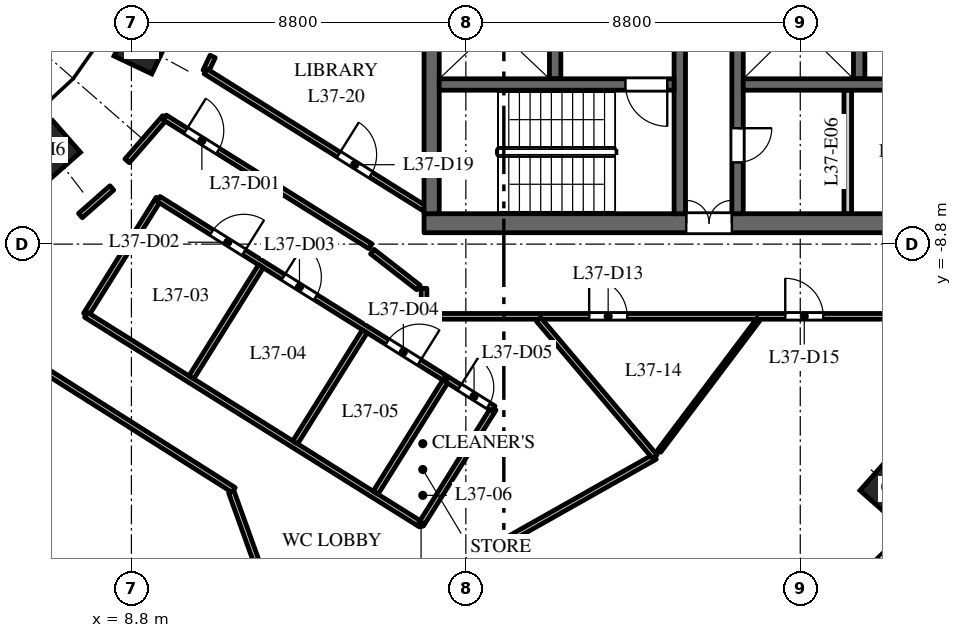
"""IFC4 building model, lengths in metres.
Left out: names, types, materials, properties, quantities, classifications, styles, units other than length and angle.
Written with IfcOpenShell. Run it as: python <this file> out.ifc"""

import sys

from ifc_helpers import new_model, si_unit, direction, frame, frame_2d, origin, origin_2d, place, context, subcontext, project, spatial, rectangle, extrude, element, fill, save


model = new_model("IFC4")
c1 = context("Model", 3, precision=1e-05, world=origin(), true_north=direction((0.0, 1.0)))
c2 = subcontext(c1, "Body", "Model", "MODEL_VIEW")
j1 = project(units=[si_unit("LENGTHUNIT", "METRE"), si_unit("PLANEANGLEUNIT", "RADIAN")], contexts=[c1])
p1 = place(None, origin())
s1 = spatial("IfcSite", under=j1, at=p1, CompositionType="ELEMENT")
p2 = place(p1, origin())
s2 = spatial("IfcBuilding", under=s1, at=p2, CompositionType="ELEMENT")
p3 = place(p2, frame((0.0, 0.0, 162.0)))
s3 = spatial("IfcBuildingStorey", under=s2, at=p3, CompositionType="ELEMENT", Elevation=162.0)
p4 = place(p3, frame((28.819, -15.23, 0.0), z_axis=(0.0, 0.0, 1.0), x_axis=(0.662635642662, 0.748941923699, 0.0)))
e1 = element("IfcColumn", 1, at=p4, inside=s3, PredefinedType="COLUMN", context=c2, shape_type="SweptSolid", body=[
    extrude(rectangle(XDim=1.2, YDim=1.2, at=origin_2d()), origin(), (0.0, 0.0, 1.0), 4.0),
])
for number, where, z_axis, x_axis in (
    (2, (6.682, -6.334, 0.0), (0.0, 0.0, 1.0), (0.751, 0.66, 0.0)),
    (3, (9.076, -3.588, 0.0), (0.0, 0.0, 1.0), (0.429, 0.903, 0.0)),
):
    element("IfcColumn", number, at=place(p3, frame(where, z_axis=z_axis, x_axis=x_axis)), inside=s3, PredefinedType="COLUMN", context=c2, shape_type="SweptSolid", body=[
        extrude(rectangle(XDim=1.1, YDim=1.1, at=origin_2d()), origin(), (0.0, 0.0, 1.0), 4.0),
    ])
p5 = place(p3, frame((16.5, -8.25, 0.0), z_axis=(0.0, 0.0, 1.0), x_axis=(1.0, 0.0, 0.0)))
e4 = element("IfcWall", 4, at=p5, inside=s3, PredefinedType="SHEAR", context=c2, shape_type="SweptSolid", body=[
    extrude(rectangle(XDim=15.0, YDim=0.5, at=frame_2d((7.5, 0.0))), origin(), (0.0, 0.0, 1.0), 3.7),
])
p6 = place(p5, frame((6.9, 0.0, 0.0)))
e5 = element("IfcOpeningElement", 5, at=p6, cuts=e4, PredefinedType="OPENING", context=c2, shape_type="SweptSolid", body=[
    extrude(rectangle(XDim=1.2, YDim=2.1, at=frame_2d((0.6, 1.05))), frame((0.0, 0.26, 0.0), z_axis=(0.0, -1.0, 0.0), x_axis=(1.0, 0.0, 0.0)), (0.0, 0.0, 1.0), 0.52),
])
p7 = place(p5, frame((12.425, 0.0, 0.0)))
e6 = element("IfcOpeningElement", 6, at=p7, cuts=e4, PredefinedType="OPENING", context=c2, shape_type="SweptSolid", body=[
    extrude(rectangle(XDim=0.9, YDim=2.1, at=frame_2d((0.45, 1.05))), frame((0.0, 0.26, 0.0), z_axis=(0.0, -1.0, 0.0), x_axis=(1.0, 0.0, 0.0)), (0.0, 0.0, 1.0), 0.52),
])
p8 = place(p3, frame((27.95, -4.45, 0.0), z_axis=(0.0, 0.0, 1.0), x_axis=(0.0, 1.0, 0.0)))
e7 = element("IfcWall", 7, at=p8, inside=s3, PredefinedType="SHEAR", context=c2, shape_type="SweptSolid", body=[
    extrude(rectangle(XDim=8.9, YDim=0.3, at=frame_2d((4.45, 0.0))), origin(), (0.0, 0.0, 1.0), 3.7),
])
p9 = place(p3, frame((19.95, -4.45, 0.0), z_axis=(0.0, 0.0, 1.0), x_axis=(0.0, 1.0, 0.0)))
e8 = element("IfcWall", 8, at=p9, inside=s3, PredefinedType="SHEAR", context=c2, shape_type="SweptSolid", body=[
    extrude(rectangle(XDim=8.9, YDim=0.3, at=frame_2d((4.45, 0.0))), origin(), (0.0, 0.0, 1.0), 3.7),
])
p10 = place(p9, frame((0.775, 0.0, 0.0)))
e9 = element("IfcOpeningElement", 9, at=p10, cuts=e8, PredefinedType="OPENING", context=c2, shape_type="SweptSolid", body=[
    extrude(rectangle(XDim=1.2, YDim=2.1, at=frame_2d((0.6, 1.05))), frame((0.0, 0.16, 0.0), z_axis=(0.0, -1.0, 0.0), x_axis=(1.0, 0.0, 0.0)), (0.0, 0.0, 1.0), 0.32),
])
p11 = place(p9, frame((4.675, 0.0, 0.0)))
e10 = element("IfcOpeningElement", 10, at=p11, cuts=e8, PredefinedType="OPENING", context=c2, shape_type="SweptSolid", body=[
    extrude(rectangle(XDim=1.1, YDim=2.1, at=frame_2d((0.55, 1.05))), frame((0.0, 0.16, 0.0), z_axis=(0.0, -1.0, 0.0), x_axis=(1.0, 0.0, 0.0)), (0.0, 0.0, 1.0), 0.32),
])
p12 = place(p9, frame((7.25, 0.0, 0.0)))
e11 = element("IfcOpeningElement", 11, at=p12, cuts=e8, PredefinedType="OPENING", context=c2, shape_type="SweptSolid", body=[
    extrude(rectangle(XDim=1.1, YDim=2.1, at=frame_2d((0.55, 1.05))), frame((0.0, 0.16, 0.0), z_axis=(0.0, -1.0, 0.0), x_axis=(1.0, 0.0, 0.0)), (0.0, 0.0, 1.0), 0.32),
])
p13 = place(p3, frame((24.75, -8.0, 0.0), z_axis=(0.0, 0.0, 1.0), x_axis=(0.0, 1.0, 0.0)))
e12 = element("IfcWall", 12, at=p13, inside=s3, PredefinedType="SHEAR", context=c2, shape_type="SweptSolid", body=[
    extrude(rectangle(XDim=16.0, YDim=0.3, at=frame_2d((8.0, 0.0))), origin(), (0.0, 0.0, 1.0), 3.7),
])
p14 = place(p13, frame((4.425, 0.0, 0.0)))
e13 = element("IfcOpeningElement", 13, at=p14, cuts=e12, PredefinedType="OPENING", context=c2, shape_type="SweptSolid", body=[
    extrude(rectangle(XDim=1.1, YDim=2.1, at=frame_2d((0.55, 1.05))), frame((0.0, 0.16, 0.0), z_axis=(0.0, -1.0, 0.0), x_axis=(1.0, 0.0, 0.0)), (0.0, 0.0, 1.0), 0.32),
])
p15 = place(p13, frame((7.45, 0.0, 0.0)))
e14 = element("IfcOpeningElement", 14, at=p15, cuts=e12, PredefinedType="OPENING", context=c2, shape_type="SweptSolid", body=[
    extrude(rectangle(XDim=1.1, YDim=2.1, at=frame_2d((0.55, 1.05))), frame((0.0, 0.16, 0.0), z_axis=(0.0, -1.0, 0.0), x_axis=(1.0, 0.0, 0.0)), (0.0, 0.0, 1.0), 0.32),
])
p16 = place(p13, frame((10.475, 0.0, 0.0)))
e15 = element("IfcOpeningElement", 15, at=p16, cuts=e12, PredefinedType="OPENING", context=c2, shape_type="SweptSolid", body=[
    extrude(rectangle(XDim=1.1, YDim=2.1, at=frame_2d((0.55, 1.05))), frame((0.0, 0.16, 0.0), z_axis=(0.0, -1.0, 0.0), x_axis=(1.0, 0.0, 0.0)), (0.0, 0.0, 1.0), 0.32),
])
p17 = place(p13, frame((13.75, 0.0, 0.0)))
e16 = element("IfcOpeningElement", 16, at=p17, cuts=e12, PredefinedType="OPENING", context=c2, shape_type="SweptSolid", body=[
    extrude(rectangle(XDim=0.9, YDim=2.1, at=frame_2d((0.45, 1.05))), frame((0.0, 0.16, 0.0), z_axis=(0.0, -1.0, 0.0), x_axis=(1.0, 0.0, 0.0)), (0.0, 0.0, 1.0), 0.32),
])
p18 = place(p13, frame((1.35, 0.0, 0.0)))
e17 = element("IfcOpeningElement", 17, at=p18, cuts=e12, PredefinedType="OPENING", context=c2, shape_type="SweptSolid", body=[
    extrude(rectangle(XDim=0.9, YDim=2.1, at=frame_2d((0.45, 1.05))), frame((0.0, 0.16, 0.0), z_axis=(0.0, -1.0, 0.0), x_axis=(1.0, 0.0, 0.0)), (0.0, 0.0, 1.0), 0.32),
])
p19 = place(p3, frame((16.7, -8.0, 0.0), z_axis=(0.0, 0.0, 1.0), x_axis=(0.0, 1.0, 0.0)))
e18 = element("IfcWall", 18, at=p19, inside=s3, PredefinedType="SHEAR", context=c2, shape_type="SweptSolid", body=[
    extrude(rectangle(XDim=16.0, YDim=0.4, at=frame_2d((8.0, 0.0))), origin(), (0.0, 0.0, 1.0), 3.7),
])
p20 = place(p3, frame((27.65, -8.0, 0.0), z_axis=(0.0, 0.0, 1.0), x_axis=(0.0, 1.0, 0.0)))
e19 = element("IfcWall", 19, at=p20, inside=s3, PredefinedType="PARTITIONING", context=c2, shape_type="SweptSolid", body=[
    extrude(rectangle(XDim=3.25, YDim=0.2, at=frame_2d((1.625, 0.0))), origin(), (0.0, 0.0, 1.0), 3.7),
])
p21 = place(p3, frame((24.9, -4.6, 0.0), z_axis=(0.0, 0.0, 1.0), x_axis=(1.0, 0.0, 0.0)))
e20 = element("IfcWall", 20, at=p21, inside=s3, PredefinedType="SHEAR", context=c2, shape_type="SweptSolid", body=[
    extrude(rectangle(XDim=6.1, YDim=0.3, at=frame_2d((3.05, 0.0))), origin(), (0.0, 0.0, 1.0), 3.7),
])
p22 = place(p3, frame((23.23, -8.0, 0.0), z_axis=(0.0, 0.0, 1.0), x_axis=(0.0, 1.0, 0.0)))
e21 = element("IfcWall", 21, at=p22, inside=s3, PredefinedType="SHEAR", context=c2, shape_type="SweptSolid", body=[
    extrude(rectangle(XDim=7.875, YDim=0.3, at=frame_2d((3.938, 0.0))), origin(), (0.0, 0.0, 1.0), 3.7),
])
p23 = place(p22, frame((5.15, 0.0, 0.0)))
e22 = element("IfcOpeningElement", 22, at=p23, cuts=e21, PredefinedType="OPENING", context=c2, shape_type="SweptSolid", body=[
    extrude(rectangle(XDim=1.1, YDim=2.1, at=frame_2d((0.55, 1.05))), frame((0.0, 0.16, 0.0), z_axis=(0.0, -1.0, 0.0), x_axis=(1.0, 0.0, 0.0)), (0.0, 0.0, 1.0), 0.32),
])
p24 = place(p3, frame((16.9, -4.6, 0.0), z_axis=(0.0, 0.0, 1.0), x_axis=(1.0, 0.0, 0.0)))
e23 = element("IfcWall", 23, at=p24, inside=s3, PredefinedType="SHEAR", context=c2, shape_type="SweptSolid", body=[
    extrude(rectangle(XDim=6.18, YDim=0.3, at=frame_2d((3.09, 0.0))), origin(), (0.0, 0.0, 1.0), 3.7),
])
p25 = place(p24, frame((4.9, 0.0, 0.0)))
e24 = element("IfcOpeningElement", 24, at=p25, cuts=e23, PredefinedType="OPENING", context=c2, shape_type="SweptSolid", body=[
    extrude(rectangle(XDim=1.1, YDim=2.1, at=frame_2d((0.55, 1.05))), frame((0.0, 0.16, 0.0), z_axis=(0.0, -1.0, 0.0), x_axis=(1.0, 0.0, 0.0)), (0.0, 0.0, 1.0), 0.32),
])
p26 = place(p3, frame((3.036, -9.915, 0.0), z_axis=(0.0, 0.0, 1.0), x_axis=(0.844814664865, -0.535059045367, 0.0)))
e25 = element("IfcWall", 25, at=p26, inside=s3, PredefinedType="PARTITIONING", context=c2, shape_type="SweptSolid", body=[
    extrude(rectangle(XDim=10.008, YDim=0.15, at=frame_2d((5.004, 0.0))), origin(), (0.0, 0.0, 1.0), 2.85),
])
p27 = place(p3, frame((7.458, -8.049, 0.0), z_axis=(0.0, 0.0, 1.0), x_axis=(0.75060787095, 0.660747927782, 0.0)))
e26 = element("IfcWall", 26, at=p27, inside=s3, PredefinedType="PARTITIONING", context=c2, shape_type="SweptSolid", body=[
    extrude(rectangle(XDim=1.1, YDim=0.15, at=frame_2d((0.55, 0.0))), origin(), (0.0, 0.0, 1.0), 3.7),
])
p28 = place(p3, frame((7.605, -10.659, 0.0), z_axis=(0.0, 0.0, 1.0), x_axis=(0.530602380468, 0.847620855006, 0.0)))
e27 = element("IfcWall", 27, at=p28, inside=s3, PredefinedType="PARTITIONING", context=c2, shape_type="SweptSolid", body=[
    extrude(rectangle(XDim=3.6, YDim=0.15, at=frame_2d((1.8, 0.0))), origin(), (0.0, 0.0, 1.0), 3.7),
])
p29 = place(p3, frame((7.608, -10.661, 0.0), z_axis=(0.0, 0.0, 1.0), x_axis=(0.847562482532, -0.530695617284, 0.0)))
e28 = element("IfcWall", 28, at=p29, inside=s3, PredefinedType="PARTITIONING", context=c2, shape_type="SweptSolid", body=[
    extrude(rectangle(XDim=10.392, YDim=0.15, at=frame_2d((5.196, 0.0))), origin(), (0.0, 0.0, 1.0), 3.7),
])
p30 = place(p3, frame((8.687, -6.609, 0.0), z_axis=(0.0, 0.0, 1.0), x_axis=(0.656454677423, 0.75436546613, 0.0)))
e29 = element("IfcWall", 29, at=p30, inside=s3, PredefinedType="PARTITIONING", context=c2, shape_type="SweptSolid", body=[
    extrude(rectangle(XDim=1.511, YDim=0.15, at=frame_2d((0.755, 0.0))), origin(), (0.0, 0.0, 1.0), 3.7),
])
p31 = place(p3, frame((9.514, -7.61, 0.0), z_axis=(0.0, 0.0, 1.0), x_axis=(0.847740567707, -0.530411095155, 0.0)))
e30 = element("IfcWall", 30, at=p31, inside=s3, PredefinedType="PARTITIONING", context=c2, shape_type="SweptSolid", body=[
    extrude(rectangle(XDim=8.944, YDim=0.15, at=frame_2d((4.472, 0.0))), origin(), (0.0, 0.0, 1.0), 3.7),
])
p32 = place(p31, frame((1.65, 0.0, 0.0)))
e31 = element("IfcOpeningElement", 31, at=p32, cuts=e30, PredefinedType="OPENING", context=c2, shape_type="SweptSolid", body=[
    extrude(rectangle(XDim=1.0, YDim=2.1, at=frame_2d((0.5, 1.05))), frame((0.0, 0.085, 0.0), z_axis=(0.0, -1.0, 0.0), x_axis=(1.0, 0.0, 0.0)), (0.0, 0.0, 1.0), 0.17),
])
p33 = place(p31, frame((3.874, 0.0, 0.0)))
e32 = element("IfcOpeningElement", 32, at=p33, cuts=e30, PredefinedType="OPENING", context=c2, shape_type="SweptSolid", body=[
    extrude(rectangle(XDim=1.0, YDim=2.1, at=frame_2d((0.5, 1.05))), frame((0.0, 0.085, 0.0), z_axis=(0.0, -1.0, 0.0), x_axis=(1.0, 0.0, 0.0)), (0.0, 0.0, 1.0), 0.17),
])
p34 = place(p31, frame((7.098, 0.0, 0.0)))
e33 = element("IfcOpeningElement", 33, at=p34, cuts=e30, PredefinedType="OPENING", context=c2, shape_type="SweptSolid", body=[
    extrude(rectangle(XDim=1.0, YDim=2.1, at=frame_2d((0.5, 1.05))), frame((0.0, 0.085, 0.0), z_axis=(0.0, -1.0, 0.0), x_axis=(1.0, 0.0, 0.0)), (0.0, 0.0, 1.0), 0.17),
])
p35 = place(p3, frame((9.679, -5.469, 0.0), z_axis=(0.0, 0.0, 1.0), x_axis=(0.847602682855, -0.530631408811, 0.0)))
e34 = element("IfcWall", 34, at=p35, inside=s3, PredefinedType="PARTITIONING", context=c2, shape_type="SweptSolid", body=[
    extrude(rectangle(XDim=6.383, YDim=0.15, at=frame_2d((3.191, 0.0))), origin(), (0.0, 0.0, 1.0), 3.7),
])
p36 = place(p35, frame((0.65, 0.0, 0.0)))
e35 = element("IfcOpeningElement", 35, at=p36, cuts=e34, PredefinedType="OPENING", context=c2, shape_type="SweptSolid", body=[
    extrude(rectangle(XDim=1.0, YDim=2.1, at=frame_2d((0.5, 1.05))), frame((0.0, 0.085, 0.0), z_axis=(0.0, -1.0, 0.0), x_axis=(1.0, 0.0, 0.0)), (0.0, 0.0, 1.0), 0.17),
])
p37 = place(p3, frame((10.377, -12.306, 0.0), z_axis=(0.0, 0.0, 1.0), x_axis=(0.530889428354, 0.847441098167, 0.0)))
e36 = element("IfcWall", 36, at=p37, inside=s3, PredefinedType="PARTITIONING", context=c2, shape_type="SweptSolid", body=[
    extrude(rectangle(XDim=3.449, YDim=0.15, at=frame_2d((1.725, 0.0))), origin(), (0.0, 0.0, 1.0), 3.7),
])
p38 = place(p3, frame((10.752, -4.254, 0.0), z_axis=(0.0, 0.0, 1.0), x_axis=(0.429758433873, 0.90294390109, 0.0)))
e37 = element("IfcWall", 37, at=p38, inside=s3, PredefinedType="PARTITIONING", context=c2, shape_type="SweptSolid", body=[
    extrude(rectangle(XDim=0.433, YDim=0.15, at=frame_2d((0.216, 0.0))), origin(), (0.0, 0.0, 1.0), 3.7),
])
p39 = place(p3, frame((10.752, -4.254, 0.0), z_axis=(0.0, 0.0, 1.0), x_axis=(0.847690706888, -0.530490777917, 0.0)))
e38 = element("IfcWall", 38, at=p39, inside=s3, PredefinedType="PARTITIONING", context=c2, shape_type="SweptSolid", body=[
    extrude(rectangle(XDim=6.781, YDim=0.15, at=frame_2d((3.39, 0.0))), origin(), (0.0, 0.0, 1.0), 3.7),
])
p40 = place(p39, frame((4.129, 0.0, 0.0)))
e39 = element("IfcOpeningElement", 39, at=p40, cuts=e38, PredefinedType="OPENING", context=c2, shape_type="SweptSolid", body=[
    extrude(rectangle(XDim=1.0, YDim=2.1, at=frame_2d((0.5, 1.05))), frame((0.0, 0.085, 0.0), z_axis=(0.0, -1.0, 0.0), x_axis=(1.0, 0.0, 0.0)), (0.0, 0.0, 1.0), 0.17),
])
p41 = place(p3, frame((11.429, -15.32, 0.0), z_axis=(0.0, 0.0, 1.0), x_axis=(0.338520464006, -0.940959029634, 0.0)))
e40 = element("IfcWall", 40, at=p41, inside=s3, PredefinedType="PARTITIONING", context=c2, shape_type="SweptSolid", body=[
    extrude(rectangle(XDim=4.735, YDim=0.15, at=frame_2d((2.368, 0.0))), origin(), (0.0, 0.0, 1.0), 3.7),
])
p42 = place(p3, frame((13.034, -19.779, 0.0), z_axis=(0.0, 0.0, 1.0), x_axis=(0.870903388322, 0.491454258512, 0.0)))
e41 = element("IfcWall", 41, at=p42, inside=s3, PredefinedType="PARTITIONING", context=c2, shape_type="SweptSolid", body=[
    extrude(rectangle(XDim=10.955, YDim=0.15, at=frame_2d((5.478, 0.0))), origin(), (0.0, 0.0, 1.0), 3.7),
])
p43 = place(p3, frame((13.11, -14.017, 0.0), z_axis=(0.0, 0.0, 1.0), x_axis=(0.530603340991, 0.847620253727, 0.0)))
e42 = element("IfcWall", 42, at=p43, inside=s3, PredefinedType="PARTITIONING", context=c2, shape_type="SweptSolid", body=[
    extrude(rectangle(XDim=3.448, YDim=0.15, at=frame_2d((1.724, 0.0))), origin(), (0.0, 0.0, 1.0), 3.7),
])
p44 = place(p3, frame((15.226, -15.341, 0.0), z_axis=(0.0, 0.0, 1.0), x_axis=(0.530602850446, 0.847620560805, 0.0)))
e43 = element("IfcWall", 43, at=p44, inside=s3, PredefinedType="PARTITIONING", context=c2, shape_type="SweptSolid", body=[
    extrude(rectangle(XDim=3.524, YDim=0.15, at=frame_2d((1.762, 0.0))), origin(), (0.0, 0.0, 1.0), 3.7),
])
p45 = place(p3, frame((16.422, -16.175, 0.0), z_axis=(0.0, 0.0, 1.0), x_axis=(0.530578570881, 0.84763575911, 0.0)))
e44 = element("IfcWall", 44, at=p45, inside=s3, PredefinedType="PARTITIONING", context=c2, shape_type="SweptSolid", body=[
    extrude(rectangle(XDim=3.596, YDim=0.15, at=frame_2d((1.798, 0.0))), origin(), (0.0, 0.0, 1.0), 3.7),
])
p46 = place(p3, frame((16.5, -10.7, 0.0), z_axis=(0.0, 0.0, 1.0), x_axis=(0.0, 1.0, 0.0)))
e45 = element("IfcWall", 45, at=p46, inside=s3, PredefinedType="PARTITIONING", context=c2, shape_type="SweptSolid", body=[
    extrude(rectangle(XDim=0.736, YDim=0.15, at=frame_2d((0.368, 0.0))), origin(), (0.0, 0.0, 1.0), 3.7),
])
p47 = place(p3, frame((16.5, -10.7, 0.0), z_axis=(0.0, 0.0, 1.0), x_axis=(1.0, 0.0, 0.0)))
e46 = element("IfcWall", 46, at=p47, inside=s3, PredefinedType="PARTITIONING", context=c2, shape_type="SweptSolid", body=[
    extrude(rectangle(XDim=15.0, YDim=0.15, at=frame_2d((7.5, 0.0))), origin(), (0.0, 0.0, 1.0), 2.75),
])
p48 = place(p47, frame((4.345, 0.0, 0.0)))
e47 = element("IfcOpeningElement", 47, at=p48, cuts=e46, PredefinedType="OPENING", context=c2, shape_type="SweptSolid", body=[
    extrude(rectangle(XDim=1.0, YDim=2.1, at=frame_2d((0.5, 1.05))), frame((0.0, 0.085, 0.0), z_axis=(0.0, -1.0, 0.0), x_axis=(1.0, 0.0, 0.0)), (0.0, 0.0, 1.0), 0.17),
])
p49 = place(p47, frame((9.505, 0.0, 0.0)))
e48 = element("IfcOpeningElement", 48, at=p49, cuts=e46, PredefinedType="OPENING", context=c2, shape_type="SweptSolid", body=[
    extrude(rectangle(XDim=1.0, YDim=2.1, at=frame_2d((0.5, 1.05))), frame((0.0, 0.085, 0.0), z_axis=(0.0, -1.0, 0.0), x_axis=(1.0, 0.0, 0.0)), (0.0, 0.0, 1.0), 0.17),
])
p50 = place(p3, frame((17.096, -12.354, 0.0), z_axis=(0.0, 0.0, 1.0), x_axis=(0.847498728789, -0.530797423412, 0.0)))
e49 = element("IfcWall", 49, at=p50, inside=s3, PredefinedType="PARTITIONING", context=c2, shape_type="SweptSolid", body=[
    extrude(rectangle(XDim=1.456, YDim=0.15, at=frame_2d((0.728, 0.0))), origin(), (0.0, 0.0, 1.0), 3.7),
])
p51 = place(p50, frame((0.4, 0.0, 0.0)))
e50 = element("IfcOpeningElement", 50, at=p51, cuts=e49, PredefinedType="OPENING", context=c2, shape_type="SweptSolid", body=[
    extrude(rectangle(XDim=0.9, YDim=2.1, at=frame_2d((0.45, 1.05))), frame((0.0, 0.085, 0.0), z_axis=(0.0, -1.0, 0.0), x_axis=(1.0, 0.0, 0.0)), (0.0, 0.0, 1.0), 0.17),
])
p52 = place(p3, frame((19.511, -10.778, 0.0), z_axis=(0.0, 0.0, 1.0), x_axis=(0.646369264436, -0.763024753197, 0.0)))
e51 = element("IfcWall", 51, at=p52, inside=s3, PredefinedType="PARTITIONING", context=c2, shape_type="SweptSolid", body=[
    extrude(rectangle(XDim=4.74, YDim=0.15, at=frame_2d((2.37, 0.0))), origin(), (0.0, 0.0, 1.0), 3.7),
])
p53 = place(p3, frame((22.688, -14.245, 0.0), z_axis=(0.0, 0.0, 1.0), x_axis=(0.6020222506, 0.798479310804, 0.0)))
e52 = element("IfcWall", 52, at=p53, inside=s3, PredefinedType="PARTITIONING", context=c2, shape_type="SweptSolid", body=[
    extrude(rectangle(XDim=4.342, YDim=0.1, at=frame_2d((2.171, 0.0))), origin(), (0.0, 0.0, 1.0), 2.75),
])
p54 = place(p3, frame((16.352, -9.942, 0.0), z_axis=(0.0, 0.0, 1.0), x_axis=(-0.788950226826, 0.614457109643, 0.0)))
e53 = element("IfcWall", 53, at=p54, inside=s3, PredefinedType="PARTITIONING", context=c2, shape_type="SweptSolid", body=[
    extrude(rectangle(XDim=1.538, YDim=0.15, at=frame_2d((0.769, 0.0))), origin(), (0.0, 0.0, 1.0), 3.7),
])
p55 = place(p25, origin())
e54 = element("IfcDoor", 54, at=p55, inside=s3, OperationType="SINGLE_SWING_RIGHT", PredefinedType="DOOR", context=c2, shape_type="SweptSolid", body=[
    extrude(rectangle(XDim=1.1, YDim=2.1, at=frame_2d((0.55, 1.05))), frame((0.0, 0.025, 0.0), z_axis=(0.0, -1.0, 0.0), x_axis=(1.0, 0.0, 0.0)), (0.0, 0.0, 1.0), 0.05),
])
fill(e24, e54)
p56 = place(p6, origin())
e55 = element("IfcDoor", 55, at=p56, inside=s3, OperationType="DOUBLE_DOOR_DOUBLE_SWING", PredefinedType="DOOR", context=c2, shape_type="SweptSolid", body=[
    extrude(rectangle(XDim=1.2, YDim=2.1, at=frame_2d((0.6, 1.05))), frame((0.0, 0.025, 0.0), z_axis=(0.0, -1.0, 0.0), x_axis=(1.0, 0.0, 0.0)), (0.0, 0.0, 1.0), 0.05),
])
fill(e5, e55)
p57 = place(p18, origin())
e56 = element("IfcDoor", 56, at=p57, inside=s3, OperationType="SINGLE_SWING_RIGHT", PredefinedType="DOOR", context=c2, shape_type="SweptSolid", body=[
    extrude(rectangle(XDim=0.9, YDim=2.1, at=frame_2d((0.45, 1.05))), frame((0.0, 0.025, 0.0), z_axis=(0.0, -1.0, 0.0), x_axis=(1.0, 0.0, 0.0)), (0.0, 0.0, 1.0), 0.05),
])
fill(e17, e56)
p58 = place(p36, origin())
e57 = element("IfcDoor", 57, at=p58, inside=s3, OperationType="SINGLE_SWING_LEFT", PredefinedType="DOOR", context=c2, shape_type="SweptSolid", body=[
    extrude(rectangle(XDim=1.0, YDim=2.1, at=frame_2d((0.5, 1.05))), frame((0.0, 0.025, 0.0), z_axis=(0.0, -1.0, 0.0), x_axis=(1.0, 0.0, 0.0)), (0.0, 0.0, 1.0), 0.05),
])
fill(e35, e57)
p59 = place(p32, origin())
e58 = element("IfcDoor", 58, at=p59, inside=s3, OperationType="SINGLE_SWING_RIGHT", PredefinedType="DOOR", context=c2, shape_type="SweptSolid", body=[
    extrude(rectangle(XDim=1.0, YDim=2.1, at=frame_2d((0.5, 1.05))), frame((0.0, 0.025, 0.0), z_axis=(0.0, -1.0, 0.0), x_axis=(1.0, 0.0, 0.0)), (0.0, 0.0, 1.0), 0.05),
])
fill(e31, e58)
p60 = place(p33, origin())
e59 = element("IfcDoor", 59, at=p60, inside=s3, OperationType="SINGLE_SWING_LEFT", PredefinedType="DOOR", context=c2, shape_type="SweptSolid", body=[
    extrude(rectangle(XDim=1.0, YDim=2.1, at=frame_2d((0.5, 1.05))), frame((0.0, 0.025, 0.0), z_axis=(0.0, -1.0, 0.0), x_axis=(1.0, 0.0, 0.0)), (0.0, 0.0, 1.0), 0.05),
])
fill(e32, e59)
p61 = place(p34, origin())
e60 = element("IfcDoor", 60, at=p61, inside=s3, OperationType="SINGLE_SWING_RIGHT", PredefinedType="DOOR", context=c2, shape_type="SweptSolid", body=[
    extrude(rectangle(XDim=1.0, YDim=2.1, at=frame_2d((0.5, 1.05))), frame((0.0, 0.025, 0.0), z_axis=(0.0, -1.0, 0.0), x_axis=(1.0, 0.0, 0.0)), (0.0, 0.0, 1.0), 0.05),
])
fill(e33, e60)
p62 = place(p51, origin())
e61 = element("IfcDoor", 61, at=p62, inside=s3, OperationType="SINGLE_SWING_LEFT", PredefinedType="DOOR", context=c2, shape_type="SweptSolid", body=[
    extrude(rectangle(XDim=0.9, YDim=2.1, at=frame_2d((0.45, 1.05))), frame((0.0, 0.025, 0.0), z_axis=(0.0, -1.0, 0.0), x_axis=(1.0, 0.0, 0.0)), (0.0, 0.0, 1.0), 0.05),
])
fill(e50, e61)
p63 = place(p48, origin())
e62 = element("IfcDoor", 62, at=p63, inside=s3, OperationType="SINGLE_SWING_LEFT", PredefinedType="DOOR", context=c2, shape_type="SweptSolid", body=[
    extrude(rectangle(XDim=1.0, YDim=2.1, at=frame_2d((0.5, 1.05))), frame((0.0, 0.025, 0.0), z_axis=(0.0, -1.0, 0.0), x_axis=(1.0, 0.0, 0.0)), (0.0, 0.0, 1.0), 0.05),
])
fill(e47, e62)
p64 = place(p49, origin())
e63 = element("IfcDoor", 63, at=p64, inside=s3, OperationType="SINGLE_SWING_LEFT", PredefinedType="DOOR", context=c2, shape_type="SweptSolid", body=[
    extrude(rectangle(XDim=1.0, YDim=2.1, at=frame_2d((0.5, 1.05))), frame((0.0, 0.025, 0.0), z_axis=(0.0, -1.0, 0.0), x_axis=(1.0, 0.0, 0.0)), (0.0, 0.0, 1.0), 0.05),
])
fill(e48, e63)
p65 = place(p40, origin())
e64 = element("IfcDoor", 64, at=p65, inside=s3, OperationType="SINGLE_SWING_LEFT", PredefinedType="DOOR", context=c2, shape_type="SweptSolid", body=[
    extrude(rectangle(XDim=1.0, YDim=2.1, at=frame_2d((0.5, 1.05))), frame((0.0, 0.025, 0.0), z_axis=(0.0, -1.0, 0.0), x_axis=(1.0, 0.0, 0.0)), (0.0, 0.0, 1.0), 0.05),
])
fill(e39, e64)
save(model, sys.argv[1])
